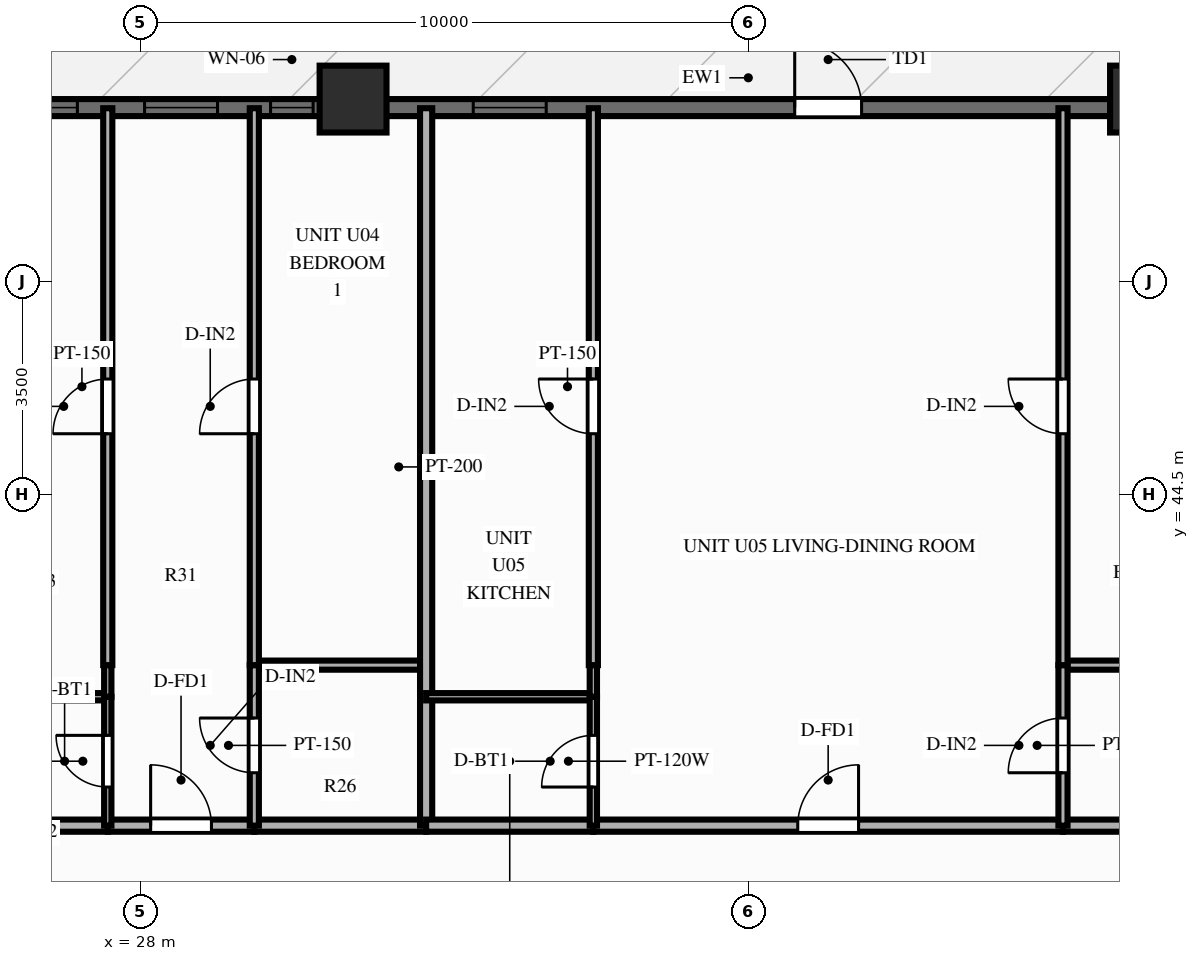
"""IFC4 building model, lengths in metres.
Left out: names, types, materials, properties, quantities, classifications, styles, units other than length and angle.
Written with IfcOpenShell. Run it as: python <this file> out.ifc"""

import sys

from ifc_helpers import new_model, si_unit, direction, frame, frame_2d, origin, origin_2d, place, context, subcontext, project, spatial, rectangle, extrude, source, transform, mapped, element, fill, save


model = new_model("IFC4")
c1 = context("Model", 3, precision=1e-05, world=origin(), true_north=direction((0.0, 1.0)))
c2 = subcontext(c1, "Body", "Model", "MODEL_VIEW")
j1 = project(units=[si_unit("LENGTHUNIT", "METRE"), si_unit("PLANEANGLEUNIT", "RADIAN")], contexts=[c1])
p1 = place(None, origin())
s1 = spatial("IfcSite", under=j1, at=p1, CompositionType="ELEMENT")
p2 = place(p1, origin())
s2 = spatial("IfcBuilding", under=s1, at=p2, CompositionType="ELEMENT")
p3 = place(p2, frame((0.0, 0.0, 52.4)))
s3 = spatial("IfcBuildingStorey", under=s2, at=p3, CompositionType="ELEMENT", Elevation=52.4)
m1 = source(origin(), c2, "Body", "SweptSolid", [
    extrude(rectangle(XDim=1.1, YDim=1.1, at=origin_2d()), origin(), (0.0, 0.0, 1.0), 3.0),
])
for number, where, z_axis, x_axis in (
    (1, (44.5, 51.0, 0.0), (0.0, 0.0, 1.0), (1.0, 0.0, 0.0)),
    (2, (31.5, 51.0, 0.0), (0.0, 0.0, 1.0), (1.0, 0.0, 0.0)),
):
    element("IfcColumn", number, at=place(p3, frame(where, z_axis=z_axis, x_axis=x_axis)), inside=s3, PredefinedType="COLUMN", context=c2, shape_type="MappedRepresentation", body=[
        mapped(m1, transform((0.0, 0.0, 0.0), scale=1.0)),
    ])
p4 = place(p3, frame((15.5, 50.86, 0.0), z_axis=(0.0, 0.0, 1.0), x_axis=(1.0, 0.0, 0.0)))
e3 = element("IfcWall", 3, at=p4, inside=s3, PredefinedType="SOLIDWALL", context=c2, shape_type="SweptSolid", body=[
    extrude(rectangle(XDim=45.0, YDim=0.28, at=frame_2d((22.5, 0.0))), origin(), (0.0, 0.0, 1.0), 2.28),
])
p5 = place(p4, frame((0.76, 0.0, 0.25)))
e4 = element("IfcOpeningElement", 4, at=p5, cuts=e3, PredefinedType="OPENING", context=c2, shape_type="SweptSolid", body=[
    extrude(rectangle(XDim=1.2, YDim=1.5, at=frame_2d((0.6, 0.75))), frame((0.0, 0.152, 0.0), z_axis=(0.0, -1.0, 0.0), x_axis=(1.0, 0.0, 0.0)), (0.0, 0.0, 1.0), 0.304),
])
p6 = place(p4, frame((2.83, 0.0, 0.25)))
e5 = element("IfcOpeningElement", 5, at=p6, cuts=e3, PredefinedType="OPENING", context=c2, shape_type="SweptSolid", body=[
    extrude(rectangle(XDim=1.2, YDim=1.5, at=frame_2d((0.6, 0.75))), frame((0.0, 0.152, 0.0), z_axis=(0.0, -1.0, 0.0), x_axis=(1.0, 0.0, 0.0)), (0.0, 0.0, 1.0), 0.304),
])
p7 = place(p4, frame((5.135, 0.0, 0.25)))
e6 = element("IfcOpeningElement", 6, at=p7, cuts=e3, PredefinedType="OPENING", context=c2, shape_type="SweptSolid", body=[
    extrude(rectangle(XDim=1.2, YDim=1.5, at=frame_2d((0.6, 0.75))), frame((0.0, 0.152, 0.0), z_axis=(0.0, -1.0, 0.0), x_axis=(1.0, 0.0, 0.0)), (0.0, 0.0, 1.0), 0.304),
])
p8 = place(p4, frame((7.753, 0.0, 0.25)))
e7 = element("IfcOpeningElement", 7, at=p8, cuts=e3, PredefinedType="OPENING", context=c2, shape_type="SweptSolid", body=[
    extrude(rectangle(XDim=1.2, YDim=1.5, at=frame_2d((0.6, 0.75))), frame((0.0, 0.152, 0.0), z_axis=(0.0, -1.0, 0.0), x_axis=(1.0, 0.0, 0.0)), (0.0, 0.0, 1.0), 0.304),
])
p9 = place(p4, frame((10.266, 0.0, 0.25)))
e8 = element("IfcOpeningElement", 8, at=p9, cuts=e3, PredefinedType="OPENING", context=c2, shape_type="SweptSolid", body=[
    extrude(rectangle(XDim=1.2, YDim=1.5, at=frame_2d((0.6, 0.75))), frame((0.0, 0.152, 0.0), z_axis=(0.0, -1.0, 0.0), x_axis=(1.0, 0.0, 0.0)), (0.0, 0.0, 1.0), 0.304),
])
p10 = place(p4, frame((12.571, 0.0, 0.25)))
e9 = element("IfcOpeningElement", 9, at=p10, cuts=e3, PredefinedType="OPENING", context=c2, shape_type="SweptSolid", body=[
    extrude(rectangle(XDim=1.2, YDim=1.5, at=frame_2d((0.6, 0.75))), frame((0.0, 0.152, 0.0), z_axis=(0.0, -1.0, 0.0), x_axis=(1.0, 0.0, 0.0)), (0.0, 0.0, 1.0), 0.304),
])
p11 = place(p4, frame((14.643, 0.0, 0.25)))
e10 = element("IfcOpeningElement", 10, at=p11, cuts=e3, PredefinedType="OPENING", context=c2, shape_type="SweptSolid", body=[
    extrude(rectangle(XDim=0.7, YDim=1.5, at=frame_2d((0.35, 0.75))), frame((0.0, 0.152, 0.0), z_axis=(0.0, -1.0, 0.0), x_axis=(1.0, 0.0, 0.0)), (0.0, 0.0, 1.0), 0.304),
])
p12 = place(p4, frame((17.977, 0.0, 0.25)))
e11 = element("IfcOpeningElement", 11, at=p12, cuts=e3, PredefinedType="OPENING", context=c2, shape_type="SweptSolid", body=[
    extrude(rectangle(XDim=1.2, YDim=1.5, at=frame_2d((0.6, 0.75))), frame((0.0, 0.152, 0.0), z_axis=(0.0, -1.0, 0.0), x_axis=(1.0, 0.0, 0.0)), (0.0, 0.0, 1.0), 0.304),
])
p13 = place(p4, frame((23.263, 0.0, 0.0)))
e12 = element("IfcOpeningElement", 12, at=p13, cuts=e3, PredefinedType="OPENING", context=c2, shape_type="SweptSolid", body=[
    extrude(rectangle(XDim=1.1, YDim=2.15, at=frame_2d((0.55, 1.075))), frame((0.0, 0.152, 0.0), z_axis=(0.0, -1.0, 0.0), x_axis=(1.0, 0.0, 0.0)), (0.0, 0.0, 1.0), 0.304),
])
p14 = place(p4, frame((29.832, 0.0, 0.25)))
e13 = element("IfcOpeningElement", 13, at=p14, cuts=e3, PredefinedType="OPENING", context=c2, shape_type="SweptSolid", body=[
    extrude(rectangle(XDim=0.95, YDim=1.5, at=frame_2d((0.475, 0.75))), frame((0.0, 0.152, 0.0), z_axis=(0.0, -1.0, 0.0), x_axis=(1.0, 0.0, 0.0)), (0.0, 0.0, 1.0), 0.304),
])
p15 = place(p4, frame((31.998, 0.0, 0.25)))
e14 = element("IfcOpeningElement", 14, at=p15, cuts=e3, PredefinedType="OPENING", context=c2, shape_type="SweptSolid", body=[
    extrude(rectangle(XDim=1.2, YDim=1.5, at=frame_2d((0.6, 0.75))), frame((0.0, 0.152, 0.0), z_axis=(0.0, -1.0, 0.0), x_axis=(1.0, 0.0, 0.0)), (0.0, 0.0, 1.0), 0.304),
])
p16 = place(p4, frame((37.023, 0.0, 0.25)))
e15 = element("IfcOpeningElement", 15, at=p16, cuts=e3, PredefinedType="OPENING", context=c2, shape_type="SweptSolid", body=[
    extrude(rectangle(XDim=1.2, YDim=1.5, at=frame_2d((0.6, 0.75))), frame((0.0, 0.152, 0.0), z_axis=(0.0, -1.0, 0.0), x_axis=(1.0, 0.0, 0.0)), (0.0, 0.0, 1.0), 0.304),
])
p17 = place(p4, frame((42.341, 0.0, 0.25)))
e16 = element("IfcOpeningElement", 16, at=p17, cuts=e3, PredefinedType="OPENING", context=c2, shape_type="SweptSolid", body=[
    extrude(rectangle(XDim=1.2, YDim=1.5, at=frame_2d((0.6, 0.75))), frame((0.0, 0.152, 0.0), z_axis=(0.0, -1.0, 0.0), x_axis=(1.0, 0.0, 0.0)), (0.0, 0.0, 1.0), 0.304),
])
p18 = place(p3, frame((25.266, 39.05, 0.0), z_axis=(0.0, 0.0, 1.0), x_axis=(1.0, 0.0, 0.0)))
e17 = element("IfcWall", 17, at=p18, inside=s3, PredefinedType="PARTITIONING", context=c2, shape_type="SweptSolid", body=[
    extrude(rectangle(XDim=2.2, YDim=0.2, at=frame_2d((1.1, 0.0))), origin(), (0.0, 0.0, 1.0), 2.79),
])
p19 = place(p3, frame((27.466, 39.05, 0.0), z_axis=(0.0, 0.0, 1.0), x_axis=(1.0, 0.0, 0.0)))
e18 = element("IfcWall", 18, at=p19, inside=s3, PredefinedType="PARTITIONING", context=c2, shape_type="SweptSolid", body=[
    extrude(rectangle(XDim=2.41, YDim=0.2, at=frame_2d((1.205, 0.0))), origin(), (0.0, 0.0, 1.0), 2.79),
])
p20 = place(p19, frame((0.705, 0.0, 0.0)))
e19 = element("IfcOpeningElement", 19, at=p20, cuts=e18, PredefinedType="OPENING", context=c2, shape_type="SweptSolid", body=[
    extrude(rectangle(XDim=1.0, YDim=2.15, at=frame_2d((0.5, 1.075))), frame((0.0, 0.112, 0.0), z_axis=(0.0, -1.0, 0.0), x_axis=(1.0, 0.0, 0.0)), (0.0, 0.0, 1.0), 0.224),
])
p21 = place(p3, frame((29.876, 39.05, 0.0), z_axis=(0.0, 0.0, 1.0), x_axis=(1.0, 0.0, 0.0)))
e20 = element("IfcWall", 20, at=p21, inside=s3, PredefinedType="PARTITIONING", context=c2, shape_type="SweptSolid", body=[
    extrude(rectangle(XDim=2.825, YDim=0.2, at=frame_2d((1.413, 0.0))), origin(), (0.0, 0.0, 1.0), 2.79),
])
p22 = place(p3, frame((25.266, 41.17, 0.0), z_axis=(0.0, 0.0, 1.0), x_axis=(1.0, 0.0, 0.0)))
e21 = element("IfcWall", 21, at=p22, inside=s3, PredefinedType="PARTITIONING", context=c2, shape_type="SweptSolid", body=[
    extrude(rectangle(XDim=2.2, YDim=0.12, at=frame_2d((1.1, 0.0))), origin(), (0.0, 0.0, 1.0), 2.79),
])
p23 = place(p3, frame((29.876, 41.69, 0.0), z_axis=(0.0, 0.0, 1.0), x_axis=(1.0, 0.0, 0.0)))
e22 = element("IfcWall", 22, at=p23, inside=s3, PredefinedType="PARTITIONING", context=c2, shape_type="SweptSolid", body=[
    extrude(rectangle(XDim=2.825, YDim=0.15, at=frame_2d((1.413, 0.0))), origin(), (0.0, 0.0, 1.0), 2.79),
])
p24 = place(p3, frame((27.466, 39.05, 0.0), z_axis=(0.0, 0.0, 1.0), x_axis=(0.0, 1.0, 0.0)))
e23 = element("IfcWall", 23, at=p24, inside=s3, PredefinedType="PARTITIONING", context=c2, shape_type="SweptSolid", body=[
    extrude(rectangle(XDim=2.12, YDim=0.12, at=frame_2d((1.06, 0.0))), origin(), (0.0, 0.0, 1.0), 2.79),
])
p25 = place(p24, frame((0.635, 0.0, 0.0)))
e24 = element("IfcOpeningElement", 24, at=p25, cuts=e23, PredefinedType="OPENING", context=c2, shape_type="SweptSolid", body=[
    extrude(rectangle(XDim=0.85, YDim=2.05, at=frame_2d((0.425, 1.025))), frame((0.0, 0.072, 0.0), z_axis=(0.0, -1.0, 0.0), x_axis=(1.0, 0.0, 0.0)), (0.0, 0.0, 1.0), 0.144),
])
p26 = place(p3, frame((27.466, 41.17, 0.0), z_axis=(0.0, 0.0, 1.0), x_axis=(0.0, 1.0, 0.0)))
e25 = element("IfcWall", 25, at=p26, inside=s3, PredefinedType="PARTITIONING", context=c2, shape_type="SweptSolid", body=[
    extrude(rectangle(XDim=0.52, YDim=0.12, at=frame_2d((0.26, 0.0))), origin(), (0.0, 0.0, 1.0), 2.79),
])
p27 = place(p3, frame((27.466, 41.69, 0.0), z_axis=(0.0, 0.0, 1.0), x_axis=(0.0, 1.0, 0.0)))
e26 = element("IfcWall", 26, at=p27, inside=s3, PredefinedType="PARTITIONING", context=c2, shape_type="SweptSolid", body=[
    extrude(rectangle(XDim=9.16, YDim=0.15, at=frame_2d((4.58, 0.0))), origin(), (0.0, 0.0, 1.0), 2.79),
])
p28 = place(p27, frame((3.806, 0.0, 0.0)))
e27 = element("IfcOpeningElement", 27, at=p28, cuts=e26, PredefinedType="OPENING", context=c2, shape_type="SweptSolid", body=[
    extrude(rectangle(XDim=0.9, YDim=2.1, at=frame_2d((0.45, 1.05))), frame((0.0, 0.087, 0.0), z_axis=(0.0, -1.0, 0.0), x_axis=(1.0, 0.0, 0.0)), (0.0, 0.0, 1.0), 0.174),
])
p29 = place(p3, frame((29.876, 39.05, 0.0), z_axis=(0.0, 0.0, 1.0), x_axis=(0.0, 1.0, 0.0)))
e28 = element("IfcWall", 28, at=p29, inside=s3, PredefinedType="PARTITIONING", context=c2, shape_type="SweptSolid", body=[
    extrude(rectangle(XDim=2.64, YDim=0.15, at=frame_2d((1.32, 0.0))), origin(), (0.0, 0.0, 1.0), 2.79),
])
p30 = place(p29, frame((0.87, 0.0, 0.0)))
e29 = element("IfcOpeningElement", 29, at=p30, cuts=e28, PredefinedType="OPENING", context=c2, shape_type="SweptSolid", body=[
    extrude(rectangle(XDim=0.9, YDim=2.1, at=frame_2d((0.45, 1.05))), frame((0.0, 0.087, 0.0), z_axis=(0.0, -1.0, 0.0), x_axis=(1.0, 0.0, 0.0)), (0.0, 0.0, 1.0), 0.174),
])
p31 = place(p3, frame((29.876, 41.69, 0.0), z_axis=(0.0, 0.0, 1.0), x_axis=(0.0, 1.0, 0.0)))
e30 = element("IfcWall", 30, at=p31, inside=s3, PredefinedType="PARTITIONING", context=c2, shape_type="SweptSolid", body=[
    extrude(rectangle(XDim=9.16, YDim=0.15, at=frame_2d((4.58, 0.0))), origin(), (0.0, 0.0, 1.0), 2.79),
])
p32 = place(p31, frame((3.806, 0.0, 0.0)))
e31 = element("IfcOpeningElement", 31, at=p32, cuts=e30, PredefinedType="OPENING", context=c2, shape_type="SweptSolid", body=[
    extrude(rectangle(XDim=0.9, YDim=2.1, at=frame_2d((0.45, 1.05))), frame((0.0, 0.087, 0.0), z_axis=(0.0, -1.0, 0.0), x_axis=(1.0, 0.0, 0.0)), (0.0, 0.0, 1.0), 0.174),
])
p33 = place(p3, frame((32.701, 39.05, 0.0), z_axis=(0.0, 0.0, 1.0), x_axis=(0.0, 1.0, 0.0)))
e32 = element("IfcWall", 32, at=p33, inside=s3, PredefinedType="PARTITIONING", context=c2, shape_type="SweptSolid", body=[
    extrude(rectangle(XDim=11.8, YDim=0.2, at=frame_2d((5.9, 0.0))), origin(), (0.0, 0.0, 1.0), 2.79),
])
p34 = place(p3, frame((32.701, 39.05, 0.0), z_axis=(0.0, 0.0, 1.0), x_axis=(1.0, 0.0, 0.0)))
e33 = element("IfcWall", 33, at=p34, inside=s3, PredefinedType="PARTITIONING", context=c2, shape_type="SweptSolid", body=[
    extrude(rectangle(XDim=2.75, YDim=0.2, at=frame_2d((1.375, 0.0))), origin(), (0.0, 0.0, 1.0), 2.79),
])
p35 = place(p3, frame((35.451, 39.05, 0.0), z_axis=(0.0, 0.0, 1.0), x_axis=(1.0, 0.0, 0.0)))
e34 = element("IfcWall", 34, at=p35, inside=s3, PredefinedType="PARTITIONING", context=c2, shape_type="SweptSolid", body=[
    extrude(rectangle(XDim=7.724, YDim=0.2, at=frame_2d((3.862, 0.0))), origin(), (0.0, 0.0, 1.0), 2.79),
])
p36 = place(p35, frame((3.362, 0.0, 0.0)))
e35 = element("IfcOpeningElement", 35, at=p36, cuts=e34, PredefinedType="OPENING", context=c2, shape_type="SweptSolid", body=[
    extrude(rectangle(XDim=1.0, YDim=2.15, at=frame_2d((0.5, 1.075))), frame((0.0, 0.112, 0.0), z_axis=(0.0, -1.0, 0.0), x_axis=(1.0, 0.0, 0.0)), (0.0, 0.0, 1.0), 0.224),
])
p37 = place(p3, frame((43.175, 39.05, 0.0), z_axis=(0.0, 0.0, 1.0), x_axis=(1.0, 0.0, 0.0)))
e36 = element("IfcWall", 36, at=p37, inside=s3, PredefinedType="PARTITIONING", context=c2, shape_type="SweptSolid", body=[
    extrude(rectangle(XDim=3.548, YDim=0.2, at=frame_2d((1.774, 0.0))), origin(), (0.0, 0.0, 1.0), 2.79),
])
p38 = place(p3, frame((32.701, 41.17, 0.0), z_axis=(0.0, 0.0, 1.0), x_axis=(1.0, 0.0, 0.0)))
e37 = element("IfcWall", 37, at=p38, inside=s3, PredefinedType="PARTITIONING", context=c2, shape_type="SweptSolid", body=[
    extrude(rectangle(XDim=2.75, YDim=0.12, at=frame_2d((1.375, 0.0))), origin(), (0.0, 0.0, 1.0), 2.79),
])
p39 = place(p3, frame((43.175, 41.69, 0.0), z_axis=(0.0, 0.0, 1.0), x_axis=(1.0, 0.0, 0.0)))
e38 = element("IfcWall", 38, at=p39, inside=s3, PredefinedType="PARTITIONING", context=c2, shape_type="SweptSolid", body=[
    extrude(rectangle(XDim=3.548, YDim=0.15, at=frame_2d((1.774, 0.0))), origin(), (0.0, 0.0, 1.0), 2.79),
])
p40 = place(p3, frame((35.451, 39.05, 0.0), z_axis=(0.0, 0.0, 1.0), x_axis=(0.0, 1.0, 0.0)))
e39 = element("IfcWall", 39, at=p40, inside=s3, PredefinedType="PARTITIONING", context=c2, shape_type="SweptSolid", body=[
    extrude(rectangle(XDim=2.12, YDim=0.12, at=frame_2d((1.06, 0.0))), origin(), (0.0, 0.0, 1.0), 2.79),
])
p41 = place(p40, frame((0.635, 0.0, 0.0)))
e40 = element("IfcOpeningElement", 40, at=p41, cuts=e39, PredefinedType="OPENING", context=c2, shape_type="SweptSolid", body=[
    extrude(rectangle(XDim=0.85, YDim=2.05, at=frame_2d((0.425, 1.025))), frame((0.0, 0.072, 0.0), z_axis=(0.0, -1.0, 0.0), x_axis=(1.0, 0.0, 0.0)), (0.0, 0.0, 1.0), 0.144),
])
p42 = place(p3, frame((35.451, 41.17, 0.0), z_axis=(0.0, 0.0, 1.0), x_axis=(0.0, 1.0, 0.0)))
e41 = element("IfcWall", 41, at=p42, inside=s3, PredefinedType="PARTITIONING", context=c2, shape_type="SweptSolid", body=[
    extrude(rectangle(XDim=0.52, YDim=0.12, at=frame_2d((0.26, 0.0))), origin(), (0.0, 0.0, 1.0), 2.79),
])
p43 = place(p3, frame((35.451, 41.69, 0.0), z_axis=(0.0, 0.0, 1.0), x_axis=(0.0, 1.0, 0.0)))
e42 = element("IfcWall", 42, at=p43, inside=s3, PredefinedType="PARTITIONING", context=c2, shape_type="SweptSolid", body=[
    extrude(rectangle(XDim=9.16, YDim=0.15, at=frame_2d((4.58, 0.0))), origin(), (0.0, 0.0, 1.0), 2.79),
])
p44 = place(p43, frame((3.806, 0.0, 0.0)))
e43 = element("IfcOpeningElement", 43, at=p44, cuts=e42, PredefinedType="OPENING", context=c2, shape_type="SweptSolid", body=[
    extrude(rectangle(XDim=0.9, YDim=2.1, at=frame_2d((0.45, 1.05))), frame((0.0, 0.087, 0.0), z_axis=(0.0, -1.0, 0.0), x_axis=(1.0, 0.0, 0.0)), (0.0, 0.0, 1.0), 0.174),
])
p45 = place(p3, frame((43.175, 39.05, 0.0), z_axis=(0.0, 0.0, 1.0), x_axis=(0.0, 1.0, 0.0)))
e44 = element("IfcWall", 44, at=p45, inside=s3, PredefinedType="PARTITIONING", context=c2, shape_type="SweptSolid", body=[
    extrude(rectangle(XDim=2.64, YDim=0.15, at=frame_2d((1.32, 0.0))), origin(), (0.0, 0.0, 1.0), 2.79),
])
p46 = place(p45, frame((0.87, 0.0, 0.0)))
e45 = element("IfcOpeningElement", 45, at=p46, cuts=e44, PredefinedType="OPENING", context=c2, shape_type="SweptSolid", body=[
    extrude(rectangle(XDim=0.9, YDim=2.1, at=frame_2d((0.45, 1.05))), frame((0.0, 0.087, 0.0), z_axis=(0.0, -1.0, 0.0), x_axis=(1.0, 0.0, 0.0)), (0.0, 0.0, 1.0), 0.174),
])
p47 = place(p3, frame((43.175, 41.69, 0.0), z_axis=(0.0, 0.0, 1.0), x_axis=(0.0, 1.0, 0.0)))
e46 = element("IfcWall", 46, at=p47, inside=s3, PredefinedType="PARTITIONING", context=c2, shape_type="SweptSolid", body=[
    extrude(rectangle(XDim=9.16, YDim=0.15, at=frame_2d((4.58, 0.0))), origin(), (0.0, 0.0, 1.0), 2.79),
])
p48 = place(p47, frame((3.806, 0.0, 0.0)))
e47 = element("IfcOpeningElement", 47, at=p48, cuts=e46, PredefinedType="OPENING", context=c2, shape_type="SweptSolid", body=[
    extrude(rectangle(XDim=0.9, YDim=2.1, at=frame_2d((0.45, 1.05))), frame((0.0, 0.087, 0.0), z_axis=(0.0, -1.0, 0.0), x_axis=(1.0, 0.0, 0.0)), (0.0, 0.0, 1.0), 0.174),
])
m2 = source(origin(), c2, "Body", "SweptSolid", [
    extrude(rectangle(XDim=1.2, YDim=1.5, at=frame_2d((0.6, 0.75))), frame((0.0, 0.03, 0.0), z_axis=(0.0, -1.0, 0.0), x_axis=(1.0, 0.0, 0.0)), (0.0, 0.0, 1.0), 0.06),
])
p49 = place(p9, origin())
e48 = element("IfcWindow", 48, at=p49, inside=s3, PartitioningType="SINGLE_PANEL", PredefinedType="WINDOW", context=c2, shape_type="MappedRepresentation", body=[
    mapped(m2, transform((0.0, 0.0, 0.0), scale=1.0)),
])
fill(e8, e48)
p50 = place(p10, origin())
e49 = element("IfcWindow", 49, at=p50, inside=s3, PartitioningType="SINGLE_PANEL", PredefinedType="WINDOW", context=c2, shape_type="MappedRepresentation", body=[
    mapped(m2, transform((0.0, 0.0, 0.0), scale=1.0)),
])
fill(e9, e49)
m3 = source(origin(), c2, "Body", "SweptSolid", [
    extrude(rectangle(XDim=0.7, YDim=1.5, at=frame_2d((0.35, 0.75))), frame((0.0, 0.03, 0.0), z_axis=(0.0, -1.0, 0.0), x_axis=(1.0, 0.0, 0.0)), (0.0, 0.0, 1.0), 0.06),
])
p51 = place(p11, origin())
e50 = element("IfcWindow", 50, at=p51, inside=s3, PartitioningType="SINGLE_PANEL", PredefinedType="WINDOW", context=c2, shape_type="MappedRepresentation", body=[
    mapped(m3, transform((0.0, 0.0, 0.0), scale=1.0)),
])
fill(e10, e50)
p52 = place(p12, origin())
e51 = element("IfcWindow", 51, at=p52, inside=s3, PartitioningType="SINGLE_PANEL", PredefinedType="WINDOW", context=c2, shape_type="MappedRepresentation", body=[
    mapped(m2, transform((0.0, 0.0, 0.0), scale=1.0)),
])
fill(e11, e51)
m4 = source(origin(), c2, "Body", "SweptSolid", [
    extrude(rectangle(XDim=1.1, YDim=2.15, at=frame_2d((0.55, 1.075))), frame((0.0, 0.025, 0.0), z_axis=(0.0, -1.0, 0.0), x_axis=(1.0, 0.0, 0.0)), (0.0, 0.0, 1.0), 0.05),
])
p53 = place(p13, origin())
e52 = element("IfcDoor", 52, at=p53, inside=s3, OperationType="SINGLE_SWING_LEFT", PredefinedType="DOOR", context=c2, shape_type="MappedRepresentation", body=[
    mapped(m4, transform((0.0, 0.0, 0.0), scale=1.0)),
])
fill(e12, e52)
m5 = source(origin(), c2, "Body", "SweptSolid", [
    extrude(rectangle(XDim=1.0, YDim=2.15, at=frame_2d((0.5, 1.075))), frame((0.0, 0.025, 0.0), z_axis=(0.0, -1.0, 0.0), x_axis=(1.0, 0.0, 0.0)), (0.0, 0.0, 1.0), 0.05),
])
p54 = place(p20, origin())
e53 = element("IfcDoor", 53, at=p54, inside=s3, OperationType="SINGLE_SWING_LEFT", PredefinedType="DOOR", context=c2, shape_type="MappedRepresentation", body=[
    mapped(m5, transform((0.0, 0.0, 0.0), scale=1.0)),
])
fill(e19, e53)
m6 = source(origin(), c2, "Body", "SweptSolid", [
    extrude(rectangle(XDim=0.85, YDim=2.05, at=frame_2d((0.425, 1.025))), frame((0.0, 0.025, 0.0), z_axis=(0.0, -1.0, 0.0), x_axis=(1.0, 0.0, 0.0)), (0.0, 0.0, 1.0), 0.05),
])
p55 = place(p25, origin())
e54 = element("IfcDoor", 54, at=p55, inside=s3, OperationType="SINGLE_SWING_RIGHT", PredefinedType="DOOR", context=c2, shape_type="MappedRepresentation", body=[
    mapped(m6, transform((0.0, 0.0, 0.0), scale=1.0)),
])
fill(e24, e54)
m7 = source(origin(), c2, "Body", "SweptSolid", [
    extrude(rectangle(XDim=0.9, YDim=2.1, at=frame_2d((0.45, 1.05))), frame((0.0, 0.025, 0.0), z_axis=(0.0, -1.0, 0.0), x_axis=(1.0, 0.0, 0.0)), (0.0, 0.0, 1.0), 0.05),
])
p56 = place(p28, origin())
e55 = element("IfcDoor", 55, at=p56, inside=s3, OperationType="SINGLE_SWING_LEFT", PredefinedType="DOOR", context=c2, shape_type="MappedRepresentation", body=[
    mapped(m7, transform((0.0, 0.0, 0.0), scale=1.0)),
])
fill(e27, e55)
p57 = place(p30, origin())
e56 = element("IfcDoor", 56, at=p57, inside=s3, OperationType="SINGLE_SWING_RIGHT", PredefinedType="DOOR", context=c2, shape_type="MappedRepresentation", body=[
    mapped(m7, transform((0.0, 0.0, 0.0), scale=1.0)),
])
fill(e29, e56)
p58 = place(p32, origin())
e57 = element("IfcDoor", 57, at=p58, inside=s3, OperationType="SINGLE_SWING_LEFT", PredefinedType="DOOR", context=c2, shape_type="MappedRepresentation", body=[
    mapped(m7, transform((0.0, 0.0, 0.0), scale=1.0)),
])
fill(e31, e57)
p59 = place(p36, origin())
e58 = element("IfcDoor", 58, at=p59, inside=s3, OperationType="SINGLE_SWING_RIGHT", PredefinedType="DOOR", context=c2, shape_type="MappedRepresentation", body=[
    mapped(m5, transform((0.0, 0.0, 0.0), scale=1.0)),
])
fill(e35, e58)
p60 = place(p41, origin())
e59 = element("IfcDoor", 59, at=p60, inside=s3, OperationType="SINGLE_SWING_LEFT", PredefinedType="DOOR", context=c2, shape_type="MappedRepresentation", body=[
    mapped(m6, transform((0.0, 0.0, 0.0), scale=1.0)),
])
fill(e40, e59)
p61 = place(p44, origin())
e60 = element("IfcDoor", 60, at=p61, inside=s3, OperationType="SINGLE_SWING_RIGHT", PredefinedType="DOOR", context=c2, shape_type="MappedRepresentation", body=[
    mapped(m7, transform((0.0, 0.0, 0.0), scale=1.0)),
])
fill(e43, e60)
p62 = place(p46, origin())
e61 = element("IfcDoor", 61, at=p62, inside=s3, OperationType="SINGLE_SWING_LEFT", PredefinedType="DOOR", context=c2, shape_type="MappedRepresentation", body=[
    mapped(m7, transform((0.0, 0.0, 0.0), scale=1.0)),
])
fill(e45, e61)
p63 = place(p48, origin())
e62 = element("IfcDoor", 62, at=p63, inside=s3, OperationType="SINGLE_SWING_RIGHT", PredefinedType="DOOR", context=c2, shape_type="MappedRepresentation", body=[
    mapped(m7, transform((0.0, 0.0, 0.0), scale=1.0)),
])
fill(e47, e62)
save(model, sys.argv[1])
